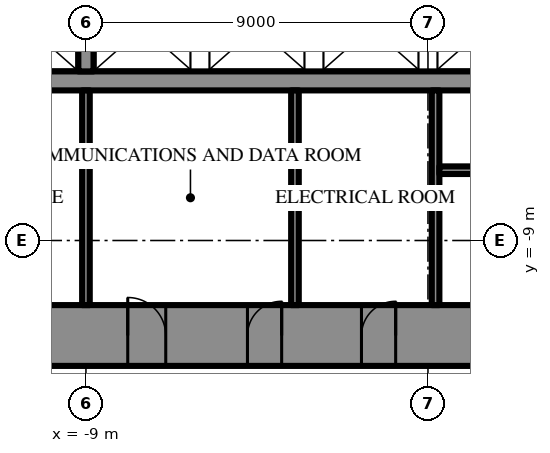
"""IFC4 building model, lengths in metres.
Left out: names, types, materials, properties, quantities, classifications, styles, units other than length and angle.
Written with IfcOpenShell. Run it as: python <this file> out.ifc"""

import sys

from ifc_helpers import new_model, si_unit, direction, frame, frame_2d, origin, place, context, subcontext, project, spatial, rectangle, extrude, element, fill, save


model = new_model("IFC4")
c1 = context("Model", 3, precision=1e-05, world=origin(), true_north=direction((0.0, 1.0)))
c2 = subcontext(c1, "Body", "Model", "MODEL_VIEW")
j1 = project(units=[si_unit("LENGTHUNIT", "METRE"), si_unit("PLANEANGLEUNIT", "RADIAN")], contexts=[c1])
p1 = place(None, origin())
s1 = spatial("IfcSite", under=j1, at=p1, CompositionType="ELEMENT")
p2 = place(p1, origin())
s2 = spatial("IfcBuilding", under=s1, at=p2, CompositionType="ELEMENT")
p3 = place(p2, frame((0.0, 0.0, 223.9)))
s3 = spatial("IfcBuildingStorey", under=s2, at=p3, CompositionType="ELEMENT", Elevation=223.9)
p4 = place(p3, frame((15.5, -11.5, 0.0), z_axis=(0.0, 0.0, 1.0), x_axis=(-1.0, 0.0, 0.0)))
e1 = element("IfcWall", 1, at=p4, inside=s3, PredefinedType="SHEAR", context=c2, shape_type="SweptSolid", body=[
    extrude(rectangle(XDim=31.0, YDim=1.6, at=frame_2d((15.5, 0.0))), origin(), (0.0, 0.0, 1.0), 4.2),
])
p5 = place(p4, frame((16.35, 0.0, 0.0)))
e2 = element("IfcOpeningElement", 2, at=p5, cuts=e1, PredefinedType="OPENING", context=c2, shape_type="SweptSolid", body=[
    extrude(rectangle(XDim=0.9, YDim=2.2, at=frame_2d((0.45, 1.1))), frame((0.0, 0.81, 0.0), z_axis=(0.0, -1.0, 0.0), x_axis=(1.0, 0.0, 0.0)), (0.0, 0.0, 1.0), 1.62),
])
p6 = place(p4, frame((19.35, 0.0, 0.0)))
e3 = element("IfcOpeningElement", 3, at=p6, cuts=e1, PredefinedType="OPENING", context=c2, shape_type="SweptSolid", body=[
    extrude(rectangle(XDim=0.9, YDim=2.2, at=frame_2d((0.45, 1.1))), frame((0.0, 0.81, 0.0), z_axis=(0.0, -1.0, 0.0), x_axis=(1.0, 0.0, 0.0)), (0.0, 0.0, 1.0), 1.62),
])
p7 = place(p4, frame((22.4, 0.0, 0.0)))
e4 = element("IfcOpeningElement", 4, at=p7, cuts=e1, PredefinedType="OPENING", context=c2, shape_type="SweptSolid", body=[
    extrude(rectangle(XDim=1.0, YDim=2.2, at=frame_2d((0.5, 1.1))), frame((0.0, 0.81, 0.0), z_axis=(0.0, -1.0, 0.0), x_axis=(1.0, 0.0, 0.0)), (0.0, 0.0, 1.0), 1.62),
])
p8 = place(p4, frame((1.65, 0.0, 0.0)))
e5 = element("IfcOpeningElement", 5, at=p8, cuts=e1, PredefinedType="OPENING", context=c2, shape_type="SweptSolid", body=[
    extrude(rectangle(XDim=0.9, YDim=2.2, at=frame_2d((0.45, 1.1))), frame((0.0, 0.81, 0.0), z_axis=(0.0, -1.0, 0.0), x_axis=(1.0, 0.0, 0.0)), (0.0, 0.0, 1.0), 1.62),
])
p9 = place(p4, frame((4.65, 0.0, 0.0)))
e6 = element("IfcOpeningElement", 6, at=p9, cuts=e1, PredefinedType="OPENING", context=c2, shape_type="SweptSolid", body=[
    extrude(rectangle(XDim=0.9, YDim=2.2, at=frame_2d((0.45, 1.1))), frame((0.0, 0.81, 0.0), z_axis=(0.0, -1.0, 0.0), x_axis=(1.0, 0.0, 0.0)), (0.0, 0.0, 1.0), 1.62),
])
p10 = place(p4, frame((25.45, 0.0, 0.0)))
e7 = element("IfcOpeningElement", 7, at=p10, cuts=e1, PredefinedType="OPENING", context=c2, shape_type="SweptSolid", body=[
    extrude(rectangle(XDim=0.9, YDim=2.2, at=frame_2d((0.45, 1.1))), frame((0.0, 0.81, 0.0), z_axis=(0.0, -1.0, 0.0), x_axis=(1.0, 0.0, 0.0)), (0.0, 0.0, 1.0), 1.62),
])
p11 = place(p4, frame((28.45, 0.0, 0.0)))
e8 = element("IfcOpeningElement", 8, at=p11, cuts=e1, PredefinedType="OPENING", context=c2, shape_type="SweptSolid", body=[
    extrude(rectangle(XDim=0.9, YDim=2.2, at=frame_2d((0.45, 1.1))), frame((0.0, 0.81, 0.0), z_axis=(0.0, -1.0, 0.0), x_axis=(1.0, 0.0, 0.0)), (0.0, 0.0, 1.0), 1.62),
])
p12 = place(p3, frame((11.7, -4.8, 0.0), z_axis=(0.0, 0.0, 1.0), x_axis=(-1.0, 0.0, 0.0)))
e9 = element("IfcWall", 9, at=p12, inside=s3, PredefinedType="SHEAR", context=c2, shape_type="SweptSolid", body=[
    extrude(rectangle(XDim=23.4, YDim=0.5, at=frame_2d((11.7, 0.0))), origin(), (0.0, 0.0, 1.0), 4.2),
])
p13 = place(p12, frame((6.6, 0.0, 0.0)))
e10 = element("IfcOpeningElement", 10, at=p13, cuts=e9, PredefinedType="OPENING", context=c2, shape_type="SweptSolid", body=[
    extrude(rectangle(XDim=1.2, YDim=2.2, at=frame_2d((0.6, 1.1))), frame((0.0, 0.26, 0.0), z_axis=(0.0, -1.0, 0.0), x_axis=(1.0, 0.0, 0.0)), (0.0, 0.0, 1.0), 0.52),
])
p14 = place(p12, frame((3.6, 0.0, 0.0)))
e11 = element("IfcOpeningElement", 11, at=p14, cuts=e9, PredefinedType="OPENING", context=c2, shape_type="SweptSolid", body=[
    extrude(rectangle(XDim=1.2, YDim=2.2, at=frame_2d((0.6, 1.1))), frame((0.0, 0.26, 0.0), z_axis=(0.0, -1.0, 0.0), x_axis=(1.0, 0.0, 0.0)), (0.0, 0.0, 1.0), 0.52),
])
p15 = place(p3, frame((-9.0, -2.25, 0.0), z_axis=(0.0, 0.0, 1.0), x_axis=(0.0, -1.0, 0.0)))
e12 = element("IfcWall", 12, at=p15, inside=s3, PredefinedType="SHEAR", context=c2, shape_type="SweptSolid", body=[
    extrude(rectangle(XDim=2.3, YDim=0.4, at=frame_2d((1.15, 0.0))), origin(), (0.0, 0.0, 1.0), 4.2),
])
p16 = place(p3, frame((0.2, -5.05, 0.0), z_axis=(0.0, 0.0, 1.0), x_axis=(0.0, -1.0, 0.0)))
e13 = element("IfcWall", 13, at=p16, inside=s3, PredefinedType="SHEAR", context=c2, shape_type="SweptSolid", body=[
    extrude(rectangle(XDim=5.65, YDim=0.2, at=frame_2d((2.825, 0.0))), origin(), (0.0, 0.0, 1.0), 4.2),
])
p17 = place(p3, frame((8.9, -7.15, 0.0), z_axis=(0.0, 0.0, 1.0), x_axis=(-1.0, 0.0, 0.0)))
e14 = element("IfcWall", 14, at=p17, inside=s3, PredefinedType="SHEAR", context=c2, shape_type="SweptSolid", body=[
    extrude(rectangle(XDim=8.6, YDim=0.2, at=frame_2d((4.3, 0.0))), origin(), (0.0, 0.0, 1.0), 4.2),
])
p18 = place(p17, frame((0.3, 0.0, 0.0)))
e15 = element("IfcOpeningElement", 15, at=p18, cuts=e14, PredefinedType="OPENING", context=c2, shape_type="SweptSolid", body=[
    extrude(rectangle(XDim=1.0, YDim=2.2, at=frame_2d((0.5, 1.1))), frame((0.0, 0.11, 0.0), z_axis=(0.0, -1.0, 0.0), x_axis=(1.0, 0.0, 0.0)), (0.0, 0.0, 1.0), 0.22),
])
for number, where, z_axis, x_axis in (
    (16, (-9.0, -5.05, 0.0), (0.0, 0.0, 1.0), (0.0, -1.0, 0.0)),
    (17, (-3.5, -5.05, 0.0), (0.0, 0.0, 1.0), (0.0, -1.0, 0.0)),
):
    element("IfcWall", number, at=place(p3, frame(where, z_axis=z_axis, x_axis=x_axis)), inside=s3, PredefinedType="PARTITIONING", context=c2, shape_type="SweptSolid", body=[
        extrude(rectangle(XDim=5.65, YDim=0.2, at=frame_2d((2.825, 0.0))), origin(), (0.0, 0.0, 1.0), 4.0),
    ])
p19 = place(p5, frame((0.9, 0.0, 0.0), z_axis=(0.0, 0.0, 1.0), x_axis=(-1.0, 0.0, 0.0)))
e18 = element("IfcDoor", 18, at=p19, inside=s3, OperationType="SINGLE_SWING_LEFT", PredefinedType="DOOR", context=c2, shape_type="SweptSolid", body=[
    extrude(rectangle(XDim=0.9, YDim=2.2, at=frame_2d((0.45, 1.1))), frame((0.0, 0.025, 0.0), z_axis=(0.0, -1.0, 0.0), x_axis=(1.0, 0.0, 0.0)), (0.0, 0.0, 1.0), 0.05),
])
fill(e2, e18)
p20 = place(p6, frame((0.9, 0.0, 0.0), z_axis=(0.0, 0.0, 1.0), x_axis=(-1.0, 0.0, 0.0)))
e19 = element("IfcDoor", 19, at=p20, inside=s3, OperationType="SINGLE_SWING_LEFT", PredefinedType="DOOR", context=c2, shape_type="SweptSolid", body=[
    extrude(rectangle(XDim=0.9, YDim=2.2, at=frame_2d((0.45, 1.1))), frame((0.0, 0.025, 0.0), z_axis=(0.0, -1.0, 0.0), x_axis=(1.0, 0.0, 0.0)), (0.0, 0.0, 1.0), 0.05),
])
fill(e3, e19)
p21 = place(p7, frame((1.0, 0.0, 0.0), z_axis=(0.0, 0.0, 1.0), x_axis=(-1.0, 0.0, 0.0)))
e20 = element("IfcDoor", 20, at=p21, inside=s3, OperationType="SINGLE_SWING_RIGHT", PredefinedType="DOOR", context=c2, shape_type="SweptSolid", body=[
    extrude(rectangle(XDim=1.0, YDim=2.2, at=frame_2d((0.5, 1.1))), frame((0.0, 0.025, 0.0), z_axis=(0.0, -1.0, 0.0), x_axis=(1.0, 0.0, 0.0)), (0.0, 0.0, 1.0), 0.05),
])
fill(e4, e20)
save(model, sys.argv[1])
